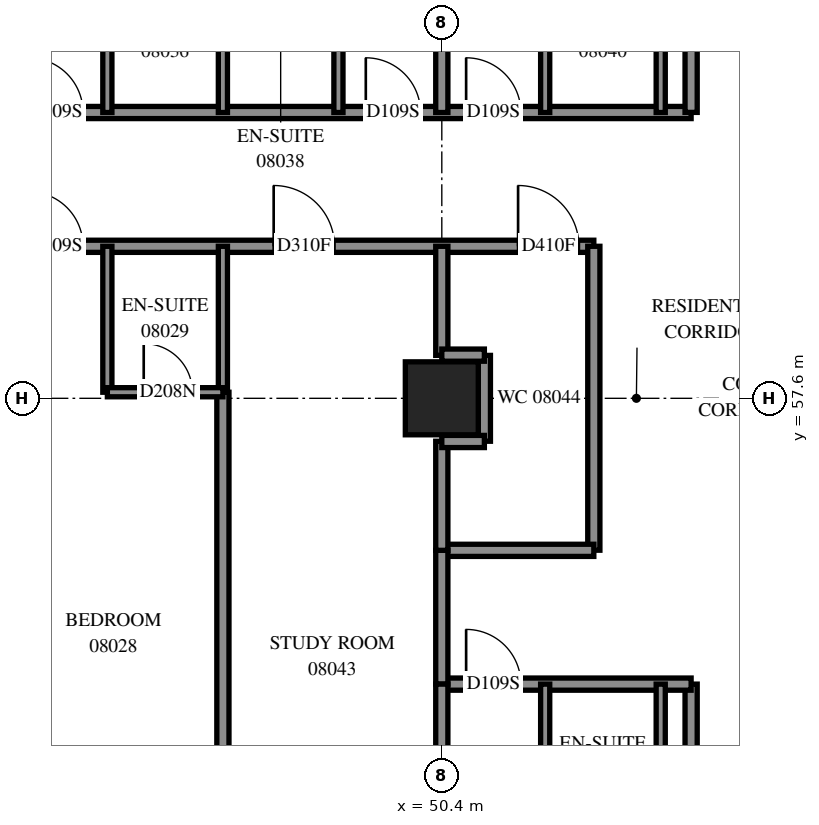
"""IFC4 building model, lengths in metres.
Left out: names, types, materials, properties, quantities, classifications, styles, units other than length and angle.
Written with IfcOpenShell. Run it as: python <this file> out.ifc"""

import sys

from ifc_helpers import new_model, si_unit, direction, frame, frame_2d, origin, origin_2d, place, context, subcontext, project, spatial, rectangle, extrude, element, fill, save


model = new_model("IFC4")
c1 = context("Model", 3, precision=1e-05, world=origin(), true_north=direction((0.0, 1.0)))
c2 = subcontext(c1, "Body", "Model", "MODEL_VIEW")
j1 = project(units=[si_unit("LENGTHUNIT", "METRE"), si_unit("PLANEANGLEUNIT", "RADIAN")], contexts=[c1])
p1 = place(None, origin())
s1 = spatial("IfcSite", under=j1, at=p1, CompositionType="ELEMENT")
p2 = place(p1, origin())
s2 = spatial("IfcBuilding", under=s1, at=p2, CompositionType="ELEMENT")
p3 = place(p2, frame((0.0, 0.0, 33.8)))
s3 = spatial("IfcBuildingStorey", under=s2, at=p3, CompositionType="ELEMENT", Elevation=33.8)
p4 = place(p3, frame((50.4, 57.6, 0.0), z_axis=(0.0, 0.0, 1.0), x_axis=(1.0, 0.0, 0.0)))
e1 = element("IfcColumn", 1, at=p4, inside=s3, PredefinedType="COLUMN", context=c2, shape_type="SweptSolid", body=[
    extrude(rectangle(XDim=1.2, YDim=1.2, at=origin_2d()), origin(), (0.0, 0.0, 1.0), 3.1),
])
p5 = place(p3, frame((28.8, 60.1, 0.0), z_axis=(0.0, 0.0, 1.0), x_axis=(1.0, 0.0, 0.0)))
e2 = element("IfcWall", 2, at=p5, inside=s3, PredefinedType="PARTITIONING", context=c2, shape_type="SweptSolid", body=[
    extrude(rectangle(XDim=24.1, YDim=0.2, at=frame_2d((12.05, 0.0))), origin(), (0.0, 0.0, 1.0), 3.1),
])
p6 = place(p5, frame((4.125, 0.0, 0.0)))
e3 = element("IfcOpeningElement", 3, at=p6, cuts=e2, PredefinedType="OPENING", context=c2, shape_type="SweptSolid", body=[
    extrude(rectangle(XDim=1.0, YDim=2.1, at=frame_2d((0.5, 1.05))), frame((0.0, 0.11, 0.0), z_axis=(0.0, -1.0, 0.0), x_axis=(1.0, 0.0, 0.0)), (0.0, 0.0, 1.0), 0.22),
])
p7 = place(p5, frame((11.62, 0.0, 0.0)))
e4 = element("IfcOpeningElement", 4, at=p7, cuts=e2, PredefinedType="OPENING", context=c2, shape_type="SweptSolid", body=[
    extrude(rectangle(XDim=0.9, YDim=2.1, at=frame_2d((0.45, 1.05))), frame((0.0, 0.11, 0.0), z_axis=(0.0, -1.0, 0.0), x_axis=(1.0, 0.0, 0.0)), (0.0, 0.0, 1.0), 0.22),
])
p8 = place(p5, frame((14.8, 0.0, 0.0)))
e5 = element("IfcOpeningElement", 5, at=p8, cuts=e2, PredefinedType="OPENING", context=c2, shape_type="SweptSolid", body=[
    extrude(rectangle(XDim=0.9, YDim=2.1, at=frame_2d((0.45, 1.05))), frame((0.0, 0.11, 0.0), z_axis=(0.0, -1.0, 0.0), x_axis=(1.0, 0.0, 0.0)), (0.0, 0.0, 1.0), 0.22),
])
p9 = place(p5, frame((18.835, 0.0, 0.0)))
e6 = element("IfcOpeningElement", 6, at=p9, cuts=e2, PredefinedType="OPENING", context=c2, shape_type="SweptSolid", body=[
    extrude(rectangle(XDim=1.0, YDim=2.1, at=frame_2d((0.5, 1.05))), frame((0.0, 0.11, 0.0), z_axis=(0.0, -1.0, 0.0), x_axis=(1.0, 0.0, 0.0)), (0.0, 0.0, 1.0), 0.22),
])
p10 = place(p5, frame((22.854, 0.0, 0.0)))
e7 = element("IfcOpeningElement", 7, at=p10, cuts=e2, PredefinedType="OPENING", context=c2, shape_type="SweptSolid", body=[
    extrude(rectangle(XDim=1.0, YDim=2.1, at=frame_2d((0.5, 1.05))), frame((0.0, 0.11, 0.0), z_axis=(0.0, -1.0, 0.0), x_axis=(1.0, 0.0, 0.0)), (0.0, 0.0, 1.0), 0.22),
])
p11 = place(p3, frame((33.502, 62.3, 0.0), z_axis=(0.0, 0.0, 1.0), x_axis=(1.0, 0.0, 0.0)))
e8 = element("IfcWall", 8, at=p11, inside=s3, PredefinedType="PARTITIONING", context=c2, shape_type="SweptSolid", body=[
    extrude(rectangle(XDim=20.998, YDim=0.2, at=frame_2d((10.499, 0.0))), origin(), (0.0, 0.0, 1.0), 3.1),
])
p12 = place(p11, frame((2.898, 0.0, 0.0)))
e9 = element("IfcOpeningElement", 9, at=p12, cuts=e8, PredefinedType="OPENING", context=c2, shape_type="SweptSolid", body=[
    extrude(rectangle(XDim=0.9, YDim=2.1, at=frame_2d((0.45, 1.05))), frame((0.0, 0.11, 0.0), z_axis=(0.0, -1.0, 0.0), x_axis=(1.0, 0.0, 0.0)), (0.0, 0.0, 1.0), 0.22),
])
p13 = place(p11, frame((8.448, 0.0, 0.0)))
e10 = element("IfcOpeningElement", 10, at=p13, cuts=e8, PredefinedType="OPENING", context=c2, shape_type="SweptSolid", body=[
    extrude(rectangle(XDim=0.9, YDim=2.1, at=frame_2d((0.45, 1.05))), frame((0.0, 0.11, 0.0), z_axis=(0.0, -1.0, 0.0), x_axis=(1.0, 0.0, 0.0)), (0.0, 0.0, 1.0), 0.22),
])
p14 = place(p11, frame((10.098, 0.0, 0.0)))
e11 = element("IfcOpeningElement", 11, at=p14, cuts=e8, PredefinedType="OPENING", context=c2, shape_type="SweptSolid", body=[
    extrude(rectangle(XDim=0.9, YDim=2.1, at=frame_2d((0.45, 1.05))), frame((0.0, 0.11, 0.0), z_axis=(0.0, -1.0, 0.0), x_axis=(1.0, 0.0, 0.0)), (0.0, 0.0, 1.0), 0.22),
])
p15 = place(p11, frame((15.648, 0.0, 0.0)))
e12 = element("IfcOpeningElement", 12, at=p15, cuts=e8, PredefinedType="OPENING", context=c2, shape_type="SweptSolid", body=[
    extrude(rectangle(XDim=0.9, YDim=2.1, at=frame_2d((0.45, 1.05))), frame((0.0, 0.11, 0.0), z_axis=(0.0, -1.0, 0.0), x_axis=(1.0, 0.0, 0.0)), (0.0, 0.0, 1.0), 0.22),
])
p16 = place(p11, frame((17.298, 0.0, 0.0)))
e13 = element("IfcOpeningElement", 13, at=p16, cuts=e8, PredefinedType="OPENING", context=c2, shape_type="SweptSolid", body=[
    extrude(rectangle(XDim=0.9, YDim=2.1, at=frame_2d((0.45, 1.05))), frame((0.0, 0.11, 0.0), z_axis=(0.0, -1.0, 0.0), x_axis=(1.0, 0.0, 0.0)), (0.0, 0.0, 1.0), 0.22),
])
p17 = place(p3, frame((46.8, 48.789, 0.0), z_axis=(0.0, 0.0, 1.0), x_axis=(0.0, 1.0, 0.0)))
e14 = element("IfcWall", 14, at=p17, inside=s3, PredefinedType="PARTITIONING", context=c2, shape_type="SweptSolid", body=[
    extrude(rectangle(XDim=8.911, YDim=0.2, at=frame_2d((4.455, 0.0))), origin(), (0.0, 0.0, 1.0), 3.1),
])
p18 = place(p3, frame((54.5, 47.3, 0.0), z_axis=(0.0, 0.0, 1.0), x_axis=(0.0, 1.0, 0.0)))
e15 = element("IfcWall", 15, at=p18, inside=s3, PredefinedType="PARTITIONING", context=c2, shape_type="SweptSolid", body=[
    extrude(rectangle(XDim=5.6, YDim=0.2, at=frame_2d((2.8, 0.0))), origin(), (0.0, 0.0, 1.0), 3.1),
])
p19 = place(p3, frame((54.5, 62.302, 0.0), z_axis=(0.0, 0.0, 1.0), x_axis=(0.0, 1.0, 0.0)))
e16 = element("IfcWall", 16, at=p19, inside=s3, PredefinedType="PARTITIONING", context=c2, shape_type="SweptSolid", body=[
    extrude(rectangle(XDim=5.598, YDim=0.2, at=frame_2d((2.799, 0.0))), origin(), (0.0, 0.0, 1.0), 3.1),
])
p20 = place(p3, frame((52.9, 55.102, 0.0), z_axis=(0.0, 0.0, 1.0), x_axis=(0.0, 1.0, 0.0)))
e17 = element("IfcWall", 17, at=p20, inside=s3, PredefinedType="PARTITIONING", context=c2, shape_type="SweptSolid", body=[
    extrude(rectangle(XDim=4.998, YDim=0.2, at=frame_2d((2.499, 0.0))), origin(), (0.0, 0.0, 1.0), 3.1),
])
p21 = place(p3, frame((50.4, 52.9, 0.0), z_axis=(0.0, 0.0, 1.0), x_axis=(1.0, 0.0, 0.0)))
e18 = element("IfcWall", 18, at=p21, inside=s3, PredefinedType="PARTITIONING", context=c2, shape_type="SweptSolid", body=[
    extrude(rectangle(XDim=4.1, YDim=0.2, at=frame_2d((2.05, 0.0))), origin(), (0.0, 0.0, 1.0), 3.1),
])
p22 = place(p21, frame((0.4, 0.0, 0.0)))
e19 = element("IfcOpeningElement", 19, at=p22, cuts=e18, PredefinedType="OPENING", context=c2, shape_type="SweptSolid", body=[
    extrude(rectangle(XDim=0.9, YDim=2.1, at=frame_2d((0.45, 1.05))), frame((0.0, 0.11, 0.0), z_axis=(0.0, -1.0, 0.0), x_axis=(1.0, 0.0, 0.0)), (0.0, 0.0, 1.0), 0.22),
])
p23 = place(p3, frame((50.4, 55.1, 0.0), z_axis=(0.0, 0.0, 1.0), x_axis=(1.0, 0.0, 0.0)))
e20 = element("IfcWall", 20, at=p23, inside=s3, PredefinedType="PARTITIONING", context=c2, shape_type="SweptSolid", body=[
    extrude(rectangle(XDim=2.5, YDim=0.2, at=frame_2d((1.25, 0.0))), origin(), (0.0, 0.0, 1.0), 3.1),
])
for number, where, z_axis, x_axis in (
    (21, (44.9, 62.3, 0.0), (0.0, 0.0, 1.0), (0.0, 1.0, 0.0)),
    (22, (46.8, 62.3, 0.0), (0.0, 0.0, 1.0), (0.0, 1.0, 0.0)),
    (23, (48.7, 62.3, 0.0), (0.0, 0.0, 1.0), (0.0, 1.0, 0.0)),
    (24, (52.1, 62.3, 0.0), (0.0, 0.0, 1.0), (0.0, 1.0, 0.0)),
    (25, (54.0, 62.3, 0.0), (0.0, 0.0, 1.0), (0.0, 1.0, 0.0)),
    (26, (44.9, 57.7, 0.0), (0.0, 0.0, 1.0), (0.0, 1.0, 0.0)),
    (27, (46.8, 57.7, 0.0), (0.0, 0.0, 1.0), (0.0, 1.0, 0.0)),
    (28, (52.1, 50.5, 0.0), (0.0, 0.0, 1.0), (0.0, 1.0, 0.0)),
    (29, (54.0, 50.5, 0.0), (0.0, 0.0, 1.0), (0.0, 1.0, 0.0)),
):
    element("IfcWall", number, at=place(p3, frame(where, z_axis=z_axis, x_axis=x_axis)), inside=s3, PredefinedType="PARTITIONING", context=c2, shape_type="SweptSolid", body=[
        extrude(rectangle(XDim=2.4, YDim=0.15, at=frame_2d((1.2, 0.0))), origin(), (0.0, 0.0, 1.0), 3.1),
    ])
p24 = place(p3, frame((50.4, 52.9, 0.0), z_axis=(0.0, 0.0, 1.0), x_axis=(0.0, 1.0, 0.0)))
e30 = element("IfcWall", 30, at=p24, inside=s3, PredefinedType="PARTITIONING", context=c2, shape_type="SweptSolid", body=[
    extrude(rectangle(XDim=2.2, YDim=0.2, at=frame_2d((1.1, 0.0))), origin(), (0.0, 0.0, 1.0), 3.1),
])
p25 = place(p3, frame((50.4, 62.3, 0.0), z_axis=(0.0, 0.0, 1.0), x_axis=(0.0, 1.0, 0.0)))
e31 = element("IfcWall", 31, at=p25, inside=s3, PredefinedType="PARTITIONING", context=c2, shape_type="SweptSolid", body=[
    extrude(rectangle(XDim=1.9, YDim=0.2, at=frame_2d((0.95, 0.0))), origin(), (0.0, 0.0, 1.0), 3.1),
])
p26 = place(p3, frame((44.9, 57.7, 0.0), z_axis=(0.0, 0.0, 1.0), x_axis=(1.0, 0.0, 0.0)))
e32 = element("IfcWall", 32, at=p26, inside=s3, PredefinedType="PARTITIONING", context=c2, shape_type="SweptSolid", body=[
    extrude(rectangle(XDim=1.9, YDim=0.15, at=frame_2d((0.95, 0.0))), origin(), (0.0, 0.0, 1.0), 3.1),
])
p27 = place(p26, frame((0.598, 0.0, 0.0)))
e33 = element("IfcOpeningElement", 33, at=p27, cuts=e32, PredefinedType="OPENING", context=c2, shape_type="SweptSolid", body=[
    extrude(rectangle(XDim=0.8, YDim=2.1, at=frame_2d((0.4, 1.05))), frame((0.0, 0.085, 0.0), z_axis=(0.0, -1.0, 0.0), x_axis=(1.0, 0.0, 0.0)), (0.0, 0.0, 1.0), 0.17),
])
p28 = place(p3, frame((50.4, 51.0, 0.0), z_axis=(0.0, 0.0, 1.0), x_axis=(0.0, 1.0, 0.0)))
e34 = element("IfcWall", 34, at=p28, inside=s3, PredefinedType="PARTITIONING", context=c2, shape_type="SweptSolid", body=[
    extrude(rectangle(XDim=1.9, YDim=0.2, at=frame_2d((0.95, 0.0))), origin(), (0.0, 0.0, 1.0), 3.1),
])
for number, where, z_axis, x_axis in (
    (35, (50.4, 58.306, 0.0), (0.0, 0.0, 1.0), (0.0, 1.0, 0.0)),
    (36, (50.4, 55.1, 0.0), (0.0, 0.0, 1.0), (0.0, 1.0, 0.0)),
):
    element("IfcWall", number, at=place(p3, frame(where, z_axis=z_axis, x_axis=x_axis)), inside=s3, PredefinedType="PARTITIONING", context=c2, shape_type="SweptSolid", body=[
        extrude(rectangle(XDim=1.794, YDim=0.2, at=frame_2d((0.897, 0.0))), origin(), (0.0, 0.0, 1.0), 3.1),
    ])
p29 = place(p3, frame((51.1, 56.894, 0.0), z_axis=(0.0, 0.0, 1.0), x_axis=(0.0, 1.0, 0.0)))
e37 = element("IfcWall", 37, at=p29, inside=s3, PredefinedType="PARTITIONING", context=c2, shape_type="SweptSolid", body=[
    extrude(rectangle(XDim=1.412, YDim=0.2, at=frame_2d((0.706, 0.0))), origin(), (0.0, 0.0, 1.0), 3.1),
])
for number, where, z_axis, x_axis in (
    (38, (50.4, 58.31, 0.0), (0.0, 0.0, 1.0), (1.0, 0.0, 0.0)),
    (39, (50.4, 56.89, 0.0), (0.0, 0.0, 1.0), (1.0, 0.0, 0.0)),
):
    element("IfcWall", number, at=place(p3, frame(where, z_axis=z_axis, x_axis=x_axis)), inside=s3, PredefinedType="PARTITIONING", context=c2, shape_type="SweptSolid", body=[
        extrude(rectangle(XDim=0.7, YDim=0.2, at=frame_2d((0.35, 0.0))), origin(), (0.0, 0.0, 1.0), 3.1),
    ])
p30 = place(p8, origin())
e40 = element("IfcDoor", 40, at=p30, inside=s3, OperationType="SINGLE_SWING_LEFT", PredefinedType="DOOR", context=c2, shape_type="SweptSolid", body=[
    extrude(rectangle(XDim=0.9, YDim=2.1, at=frame_2d((0.45, 1.05))), frame((0.0, 0.025, 0.0), z_axis=(0.0, -1.0, 0.0), x_axis=(1.0, 0.0, 0.0)), (0.0, 0.0, 1.0), 0.05),
])
fill(e5, e40)
p31 = place(p27, origin())
e41 = element("IfcDoor", 41, at=p31, inside=s3, OperationType="SINGLE_SWING_RIGHT", PredefinedType="DOOR", context=c2, shape_type="SweptSolid", body=[
    extrude(rectangle(XDim=0.8, YDim=2.1, at=frame_2d((0.4, 1.05))), frame((0.0, 0.025, 0.0), z_axis=(0.0, -1.0, 0.0), x_axis=(1.0, 0.0, 0.0)), (0.0, 0.0, 1.0), 0.05),
])
fill(e33, e41)
p32 = place(p14, origin())
e42 = element("IfcDoor", 42, at=p32, inside=s3, OperationType="SINGLE_SWING_RIGHT", PredefinedType="DOOR", context=c2, shape_type="SweptSolid", body=[
    extrude(rectangle(XDim=0.9, YDim=2.1, at=frame_2d((0.45, 1.05))), frame((0.0, 0.025, 0.0), z_axis=(0.0, -1.0, 0.0), x_axis=(1.0, 0.0, 0.0)), (0.0, 0.0, 1.0), 0.05),
])
fill(e11, e42)
p33 = place(p15, origin())
e43 = element("IfcDoor", 43, at=p33, inside=s3, OperationType="SINGLE_SWING_LEFT", PredefinedType="DOOR", context=c2, shape_type="SweptSolid", body=[
    extrude(rectangle(XDim=0.9, YDim=2.1, at=frame_2d((0.45, 1.05))), frame((0.0, 0.025, 0.0), z_axis=(0.0, -1.0, 0.0), x_axis=(1.0, 0.0, 0.0)), (0.0, 0.0, 1.0), 0.05),
])
fill(e12, e43)
p34 = place(p16, origin())
e44 = element("IfcDoor", 44, at=p34, inside=s3, OperationType="SINGLE_SWING_RIGHT", PredefinedType="DOOR", context=c2, shape_type="SweptSolid", body=[
    extrude(rectangle(XDim=0.9, YDim=2.1, at=frame_2d((0.45, 1.05))), frame((0.0, 0.025, 0.0), z_axis=(0.0, -1.0, 0.0), x_axis=(1.0, 0.0, 0.0)), (0.0, 0.0, 1.0), 0.05),
])
fill(e13, e44)
p35 = place(p9, origin())
e45 = element("IfcDoor", 45, at=p35, inside=s3, OperationType="SINGLE_SWING_RIGHT", PredefinedType="DOOR", context=c2, shape_type="SweptSolid", body=[
    extrude(rectangle(XDim=1.0, YDim=2.1, at=frame_2d((0.5, 1.05))), frame((0.0, 0.025, 0.0), z_axis=(0.0, -1.0, 0.0), x_axis=(1.0, 0.0, 0.0)), (0.0, 0.0, 1.0), 0.05),
])
fill(e6, e45)
p36 = place(p10, origin())
e46 = element("IfcDoor", 46, at=p36, inside=s3, OperationType="SINGLE_SWING_LEFT", PredefinedType="DOOR", context=c2, shape_type="SweptSolid", body=[
    extrude(rectangle(XDim=1.0, YDim=2.1, at=frame_2d((0.5, 1.05))), frame((0.0, 0.025, 0.0), z_axis=(0.0, -1.0, 0.0), x_axis=(1.0, 0.0, 0.0)), (0.0, 0.0, 1.0), 0.05),
])
fill(e7, e46)
p37 = place(p22, origin())
e47 = element("IfcDoor", 47, at=p37, inside=s3, OperationType="SINGLE_SWING_LEFT", PredefinedType="DOOR", context=c2, shape_type="SweptSolid", body=[
    extrude(rectangle(XDim=0.9, YDim=2.1, at=frame_2d((0.45, 1.05))), frame((0.0, 0.025, 0.0), z_axis=(0.0, -1.0, 0.0), x_axis=(1.0, 0.0, 0.0)), (0.0, 0.0, 1.0), 0.05),
])
fill(e19, e47)
save(model, sys.argv[1])
